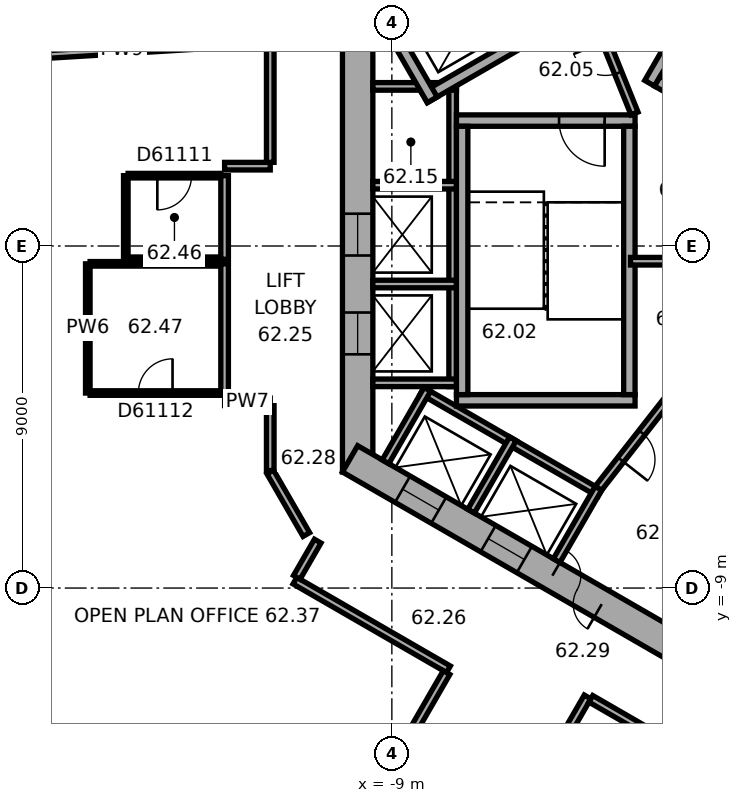
"""IFC4 building model, lengths in metres.
Left out: names, types, materials, properties, quantities, classifications, styles, units other than length and angle.
Written with IfcOpenShell. Run it as: python <this file> out.ifc"""

import sys

from ifc_helpers import new_model, si_unit, direction, frame, frame_2d, origin, place, context, subcontext, project, spatial, rectangle, extrude, element, fill, save


model = new_model("IFC4")
c1 = context("Model", 3, precision=1e-05, world=origin(), true_north=direction((0.0, 1.0)))
c2 = subcontext(c1, "Body", "Model", "MODEL_VIEW")
j1 = project(units=[si_unit("LENGTHUNIT", "METRE"), si_unit("PLANEANGLEUNIT", "RADIAN")], contexts=[c1])
p1 = place(None, origin())
s1 = spatial("IfcSite", under=j1, at=p1, CompositionType="ELEMENT")
p2 = place(p1, origin())
s2 = spatial("IfcBuilding", under=s1, at=p2, CompositionType="ELEMENT")
p3 = place(p2, frame((0.0, 0.0, 251.3)))
s3 = spatial("IfcBuildingStorey", under=s2, at=p3, CompositionType="ELEMENT", Elevation=251.3)
p4 = place(p3, frame((-9.9, 5.947, 0.0), z_axis=(0.0, 0.0, 1.0), x_axis=(0.0, -1.0, 0.0)))
e1 = element("IfcWall", 1, at=p4, inside=s3, PredefinedType="SHEAR", context=c2, shape_type="SweptSolid", body=[
    extrude(rectangle(XDim=11.894, YDim=0.8, at=frame_2d((5.947, 0.0))), origin(), (0.0, 0.0, 1.0), 3.7),
])
p5 = place(p4, frame((5.097, 0.0, 0.0)))
e2 = element("IfcOpeningElement", 2, at=p5, cuts=e1, PredefinedType="OPENING", context=c2, shape_type="SweptSolid", body=[
    extrude(rectangle(XDim=1.1, YDim=2.1, at=frame_2d((0.55, 1.05))), frame((0.0, 0.41, 0.0), z_axis=(0.0, -1.0, 0.0), x_axis=(1.0, 0.0, 0.0)), (0.0, 0.0, 1.0), 0.82),
])
p6 = place(p4, frame((7.697, 0.0, 0.0)))
e3 = element("IfcOpeningElement", 3, at=p6, cuts=e1, PredefinedType="OPENING", context=c2, shape_type="SweptSolid", body=[
    extrude(rectangle(XDim=1.1, YDim=2.1, at=frame_2d((0.55, 1.05))), frame((0.0, 0.41, 0.0), z_axis=(0.0, -1.0, 0.0), x_axis=(1.0, 0.0, 0.0)), (0.0, 0.0, 1.0), 0.82),
])
p7 = place(p3, frame((-10.1, -5.6, 0.0), z_axis=(0.0, 0.0, 1.0), x_axis=(0.866023897231, -0.500002609418, 0.0)))
e4 = element("IfcWall", 4, at=p7, inside=s3, PredefinedType="SHEAR", context=c2, shape_type="SweptSolid", body=[
    extrude(rectangle(XDim=11.894, YDim=0.8, at=frame_2d((5.947, 0.0))), origin(), (0.0, 0.0, 1.0), 3.7),
])
p8 = place(p7, frame((6.147, 0.0, 0.0)))
e5 = element("IfcOpeningElement", 5, at=p8, cuts=e4, PredefinedType="OPENING", context=c2, shape_type="SweptSolid", body=[
    extrude(rectangle(XDim=1.5, YDim=2.1, at=frame_2d((0.75, 1.05))), frame((0.0, 0.41, 0.0), z_axis=(0.0, -1.0, 0.0), x_axis=(1.0, 0.0, 0.0)), (0.0, 0.0, 1.0), 0.82),
])
p9 = place(p7, frame((1.597, 0.0, 0.0)))
e6 = element("IfcOpeningElement", 6, at=p9, cuts=e4, PredefinedType="OPENING", context=c2, shape_type="SweptSolid", body=[
    extrude(rectangle(XDim=1.1, YDim=2.1, at=frame_2d((0.55, 1.05))), frame((0.0, 0.41, 0.0), z_axis=(0.0, -1.0, 0.0), x_axis=(1.0, 0.0, 0.0)), (0.0, 0.0, 1.0), 0.82),
])
p10 = place(p7, frame((4.197, 0.0, 0.0)))
e7 = element("IfcOpeningElement", 7, at=p10, cuts=e4, PredefinedType="OPENING", context=c2, shape_type="SweptSolid", body=[
    extrude(rectangle(XDim=1.1, YDim=2.1, at=frame_2d((0.55, 1.05))), frame((0.0, 0.41, 0.0), z_axis=(0.0, -1.0, 0.0), x_axis=(1.0, 0.0, 0.0)), (0.0, 0.0, 1.0), 0.82),
])
p11 = place(p3, frame((-19.873, -9.869, 0.0), z_axis=(0.0, 0.0, 1.0), x_axis=(0.52626914263, -0.850318051975, 0.0)))
e8 = element("IfcWall", 8, at=p11, inside=s3, PredefinedType="STANDARD", context=c2, shape_type="SweptSolid", body=[
    extrude(rectangle(XDim=4.13, YDim=0.2, at=frame_2d((2.065, 0.0))), origin(), (0.0, 0.0, 1.0), 3.7),
])
p12 = place(p11, frame((0.665, 0.0, 0.9)))
e9 = element("IfcOpeningElement", 9, at=p12, cuts=e8, PredefinedType="OPENING", context=c2, shape_type="SweptSolid", body=[
    extrude(rectangle(XDim=2.8, YDim=2.0, at=frame_2d((1.4, 1.0))), frame((0.0, 0.11, 0.0), z_axis=(0.0, -1.0, 0.0), x_axis=(1.0, 0.0, 0.0)), (0.0, 0.0, 1.0), 0.22),
])
p13 = place(p3, frame((-7.4, 4.3, 0.0), z_axis=(0.0, 0.0, 1.0), x_axis=(0.0, -1.0, 0.0)))
e10 = element("IfcWall", 10, at=p13, inside=s3, PredefinedType="PARTITIONING", context=c2, shape_type="SweptSolid", body=[
    extrude(rectangle(XDim=8.0, YDim=0.2, at=frame_2d((4.0, 0.0))), origin(), (0.0, 0.0, 1.0), 3.35),
])
for number, where, z_axis, x_axis in (
    (11, (-7.3, 4.2, 0.0), (0.0, 0.0, 1.0), (-1.0, 0.0, 0.0)),
    (12, (-7.3, 1.6, 0.0), (0.0, 0.0, 1.0), (-1.0, 0.0, 0.0)),
    (13, (-7.3, -1.0, 0.0), (0.0, 0.0, 1.0), (-1.0, 0.0, 0.0)),
    (14, (-7.3, -3.6, 0.0), (0.0, 0.0, 1.0), (-1.0, 0.0, 0.0)),
):
    element("IfcWall", number, at=place(p3, frame(where, z_axis=z_axis, x_axis=x_axis)), inside=s3, PredefinedType="PARTITIONING", context=c2, shape_type="SweptSolid", body=[
        extrude(rectangle(XDim=2.2, YDim=0.2, at=frame_2d((1.1, 0.0))), origin(), (0.0, 0.0, 1.0), 3.35),
    ])
p14 = place(p3, frame((-8.203, -3.809, 0.0), z_axis=(0.0, 0.0, 1.0), x_axis=(0.866028230842, -0.499995103361, 0.0)))
e15 = element("IfcWall", 15, at=p14, inside=s3, PredefinedType="PARTITIONING", context=c2, shape_type="SweptSolid", body=[
    extrude(rectangle(XDim=5.4, YDim=0.2, at=frame_2d((2.7, 0.0))), origin(), (0.0, 0.0, 1.0), 3.35),
])
for number, where, z_axis, x_axis in (
    (16, (-8.067, -3.772, 0.0), (0.0, 0.0, 1.0), (-0.5, -0.866, 0.0)),
    (17, (-5.815, -5.072, 0.0), (0.0, 0.0, 1.0), (-0.5, -0.866, 0.0)),
):
    element("IfcWall", number, at=place(p3, frame(where, z_axis=z_axis, x_axis=x_axis)), inside=s3, PredefinedType="PARTITIONING", context=c2, shape_type="SweptSolid", body=[
        extrude(rectangle(XDim=2.2, YDim=0.2, at=frame_2d((1.1, 0.0))), origin(), (0.0, 0.0, 1.0), 3.35),
    ])
p15 = place(p3, frame((-3.563, -6.372, 0.0), z_axis=(0.0, 0.0, 1.0), x_axis=(-0.499994660107, -0.866028486751, 0.0)))
e18 = element("IfcWall", 18, at=p15, inside=s3, PredefinedType="PARTITIONING", context=c2, shape_type="SweptSolid", body=[
    extrude(rectangle(XDim=2.2, YDim=0.2, at=frame_2d((1.1, 0.0))), origin(), (0.0, 0.0, 1.0), 3.35),
])
p16 = place(p3, frame((-2.216, 4.282, 0.0), z_axis=(0.0, 0.0, 1.0), x_axis=(0.499977259774, 0.866038532462, 0.0)))
e19 = element("IfcWall", 19, at=p16, inside=s3, PredefinedType="SHEAR", context=c2, shape_type="SweptSolid", body=[
    extrude(rectangle(XDim=4.7, YDim=0.3, at=frame_2d((2.35, 0.0))), origin(), (0.0, 0.0, 1.0), 3.35),
])
p17 = place(p3, frame((4.103, 0.807, 0.0), z_axis=(0.0, 0.0, 1.0), x_axis=(-0.866027801685, 0.499995846692, 0.0)))
e20 = element("IfcWall", 20, at=p17, inside=s3, PredefinedType="SHEAR", context=c2, shape_type="SweptSolid", body=[
    extrude(rectangle(XDim=7.06, YDim=0.3, at=frame_2d((3.53, 0.0))), origin(), (0.0, 0.0, 1.0), 3.35),
])
p18 = place(p3, frame((-2.6, 3.3, 0.0), z_axis=(0.0, 0.0, 1.0), x_axis=(-1.0, 0.0, 0.0)))
e21 = element("IfcWall", 21, at=p18, inside=s3, PredefinedType="SHEAR", context=c2, shape_type="SweptSolid", body=[
    extrude(rectangle(XDim=4.7, YDim=0.3, at=frame_2d((2.35, 0.0))), origin(), (0.0, 0.0, 1.0), 3.35),
])
p19 = place(p18, frame((0.8, 0.0, 0.0)))
e22 = element("IfcOpeningElement", 22, at=p19, cuts=e21, PredefinedType="OPENING", context=c2, shape_type="SweptSolid", body=[
    extrude(rectangle(XDim=1.2, YDim=2.1, at=frame_2d((0.6, 1.05))), frame((0.0, 0.16, 0.0), z_axis=(0.0, -1.0, 0.0), x_axis=(1.0, 0.0, 0.0)), (0.0, 0.0, 1.0), 0.32),
])
p20 = place(p3, frame((-2.6, -4.06, 0.0), z_axis=(0.0, 0.0, 1.0), x_axis=(-1.0, 0.0, 0.0)))
e23 = element("IfcWall", 23, at=p20, inside=s3, PredefinedType="SHEAR", context=c2, shape_type="SweptSolid", body=[
    extrude(rectangle(XDim=4.7, YDim=0.3, at=frame_2d((2.35, 0.0))), origin(), (0.0, 0.0, 1.0), 3.35),
])
for number, where, z_axis, x_axis in (
    (24, (-2.75, 3.15, 0.0), (0.0, 0.0, 1.0), (0.0, -1.0, 0.0)),
    (25, (-7.15, 3.15, 0.0), (0.0, 0.0, 1.0), (0.0, -1.0, 0.0)),
):
    element("IfcWall", number, at=place(p3, frame(where, z_axis=z_axis, x_axis=x_axis)), inside=s3, PredefinedType="SHEAR", context=c2, shape_type="SweptSolid", body=[
        extrude(rectangle(XDim=7.06, YDim=0.3, at=frame_2d((3.53, 0.0))), origin(), (0.0, 0.0, 1.0), 3.35),
    ])
p21 = place(p3, frame((-5.24, 5.577, 0.0), z_axis=(0.0, 0.0, 1.0), x_axis=(-0.866014461049, -0.500018952895, 0.0)))
e26 = element("IfcWall", 26, at=p21, inside=s3, PredefinedType="SHEAR", context=c2, shape_type="SweptSolid", body=[
    extrude(rectangle(XDim=3.35, YDim=0.3, at=frame_2d((1.675, 0.0))), origin(), (0.0, 0.0, 1.0), 3.35),
])
p22 = place(p3, frame((-7.937, 3.847, 0.0), z_axis=(0.0, 0.0, 1.0), x_axis=(-0.50002983664, 0.866008176907, 0.0)))
e27 = element("IfcWall", 27, at=p22, inside=s3, PredefinedType="SHEAR", context=c2, shape_type="SweptSolid", body=[
    extrude(rectangle(XDim=2.2, YDim=0.3, at=frame_2d((1.1, 0.0))), origin(), (0.0, 0.0, 1.0), 3.35),
])
p23 = place(p3, frame((-2.615, 3.487, 0.0), z_axis=(0.0, 0.0, 1.0), x_axis=(-0.373576831041, 0.92759924068, 0.0)))
e28 = element("IfcWall", 28, at=p23, inside=s3, PredefinedType="PARTITIONING", context=c2, shape_type="SweptSolid", body=[
    extrude(rectangle(XDim=3.002, YDim=0.2, at=frame_2d((1.501, 0.0))), origin(), (0.0, 0.0, 1.0), 3.35),
])
p24 = place(p23, frame((1.15, 0.0, 0.0)))
e29 = element("IfcOpeningElement", 29, at=p24, cuts=e28, PredefinedType="OPENING", context=c2, shape_type="SweptSolid", body=[
    extrude(rectangle(XDim=0.9, YDim=2.1, at=frame_2d((0.45, 1.05))), frame((0.0, 0.11, 0.0), z_axis=(0.0, -1.0, 0.0), x_axis=(1.0, 0.0, 0.0)), (0.0, 0.0, 1.0), 0.22),
])
p25 = place(p3, frame((-1.712, -4.008, 0.0), z_axis=(0.0, 0.0, 1.0), x_axis=(-0.616549420702, -0.787316208287, 0.0)))
e30 = element("IfcWall", 30, at=p25, inside=s3, PredefinedType="PARTITIONING", context=c2, shape_type="SweptSolid", body=[
    extrude(rectangle(XDim=3.002, YDim=0.2, at=frame_2d((1.501, 0.0))), origin(), (0.0, 0.0, 1.0), 3.35),
])
p26 = place(p25, frame((1.15, 0.0, 0.0)))
e31 = element("IfcOpeningElement", 31, at=p26, cuts=e30, PredefinedType="OPENING", context=c2, shape_type="SweptSolid", body=[
    extrude(rectangle(XDim=0.9, YDim=2.1, at=frame_2d((0.45, 1.05))), frame((0.0, 0.11, 0.0), z_axis=(0.0, -1.0, 0.0), x_axis=(1.0, 0.0, 0.0)), (0.0, 0.0, 1.0), 0.22),
])
p27 = place(p3, frame((-2.72, -0.4, 0.0), z_axis=(0.0, 0.0, 1.0), x_axis=(1.0, 0.0, 0.0)))
e32 = element("IfcWall", 32, at=p27, inside=s3, PredefinedType="PARTITIONING", context=c2, shape_type="SweptSolid", body=[
    extrude(rectangle(XDim=7.347, YDim=0.2, at=frame_2d((3.674, 0.0))), origin(), (0.0, 0.0, 1.0), 3.35),
])
p28 = place(p3, frame((-19.888, 4.927, 0.0), z_axis=(0.0, 0.0, 1.0), x_axis=(0.998133794525, 0.061064950896, 0.0)))
e33 = element("IfcWall", 33, at=p28, inside=s3, PredefinedType="PARTITIONING", context=c2, shape_type="SweptSolid", body=[
    extrude(rectangle(XDim=7.592, YDim=0.2, at=frame_2d((3.796, 0.0))), origin(), (0.0, 0.0, 1.0), 3.35),
])
p29 = place(p3, frame((-17.001, -3.869, 0.0), z_axis=(0.0, 0.0, 1.0), x_axis=(0.0, 1.0, 0.0)))
e34 = element("IfcWall", 34, at=p29, inside=s3, PredefinedType="PARTITIONING", context=c2, shape_type="SweptSolid", body=[
    extrude(rectangle(XDim=3.4, YDim=0.12, at=frame_2d((1.7, 0.0))), origin(), (0.0, 0.0, 1.0), 3.35),
])
p30 = place(p3, frame((-16.941, -0.469, 0.0), z_axis=(0.0, 0.0, 1.0), x_axis=(1.0, 0.0, 0.0)))
e35 = element("IfcWall", 35, at=p30, inside=s3, PredefinedType="PARTITIONING", context=c2, shape_type="SweptSolid", body=[
    extrude(rectangle(XDim=3.44, YDim=0.12, at=frame_2d((1.72, 0.0))), origin(), (0.0, 0.0, 1.0), 3.35),
])
p31 = place(p3, frame((-16.001, -0.349, 0.0), z_axis=(0.0, 0.0, 1.0), x_axis=(0.0, 1.0, 0.0)))
e36 = element("IfcWall", 36, at=p31, inside=s3, PredefinedType="PARTITIONING", context=c2, shape_type="SweptSolid", body=[
    extrude(rectangle(XDim=2.2, YDim=0.12, at=frame_2d((1.1, 0.0))), origin(), (0.0, 0.0, 1.0), 3.35),
])
p32 = place(p3, frame((-15.941, 1.851, 0.0), z_axis=(0.0, 0.0, 1.0), x_axis=(1.0, 0.0, 0.0)))
e37 = element("IfcWall", 37, at=p32, inside=s3, PredefinedType="PARTITIONING", context=c2, shape_type="SweptSolid", body=[
    extrude(rectangle(XDim=2.44, YDim=0.12, at=frame_2d((1.22, 0.0))), origin(), (0.0, 0.0, 1.0), 3.35),
])
p33 = place(p32, frame((0.77, 0.0, 0.0)))
e38 = element("IfcOpeningElement", 38, at=p33, cuts=e37, PredefinedType="OPENING", context=c2, shape_type="SweptSolid", body=[
    extrude(rectangle(XDim=0.9, YDim=2.1, at=frame_2d((0.45, 1.05))), frame((0.0, 0.07, 0.0), z_axis=(0.0, -1.0, 0.0), x_axis=(1.0, 0.0, 0.0)), (0.0, 0.0, 1.0), 0.14),
])
p34 = place(p3, frame((-13.501, -3.869, 0.0), z_axis=(0.0, 0.0, 1.0), x_axis=(-1.0, 0.0, 0.0)))
e39 = element("IfcWall", 39, at=p34, inside=s3, PredefinedType="PARTITIONING", context=c2, shape_type="SweptSolid", body=[
    extrude(rectangle(XDim=3.44, YDim=0.12, at=frame_2d((1.72, 0.0))), origin(), (0.0, 0.0, 1.0), 3.35),
])
p35 = place(p34, frame((1.27, 0.0, 0.0)))
e40 = element("IfcOpeningElement", 40, at=p35, cuts=e39, PredefinedType="OPENING", context=c2, shape_type="SweptSolid", body=[
    extrude(rectangle(XDim=0.9, YDim=2.1, at=frame_2d((0.45, 1.05))), frame((0.0, 0.07, 0.0), z_axis=(0.0, -1.0, 0.0), x_axis=(1.0, 0.0, 0.0)), (0.0, 0.0, 1.0), 0.14),
])
p36 = place(p3, frame((-13.501, -0.349, 0.0), z_axis=(0.0, 0.0, 1.0), x_axis=(-1.0, 0.0, 0.0)))
e41 = element("IfcWall", 41, at=p36, inside=s3, PredefinedType="PARTITIONING", context=c2, shape_type="SweptSolid", body=[
    extrude(rectangle(XDim=2.44, YDim=0.12, at=frame_2d((1.22, 0.0))), origin(), (0.0, 0.0, 1.0), 3.35),
])
p37 = place(p3, frame((-13.401, -4.101, 0.0), z_axis=(0.0, 0.0, 1.0), x_axis=(1.0, 0.0, 0.0)))
e42 = element("IfcWall", 42, at=p37, inside=s3, PredefinedType="PARTITIONING", context=c2, shape_type="SweptSolid", body=[
    extrude(rectangle(XDim=1.201, YDim=0.2, at=frame_2d((0.601, 0.0))), origin(), (0.0, 0.0, 1.0), 3.35),
])
p38 = place(p3, frame((-13.401, -0.469, 0.0), z_axis=(0.0, 0.0, 1.0), x_axis=(0.0, -1.0, 0.0)))
e43 = element("IfcWall", 43, at=p38, inside=s3, PredefinedType="PARTITIONING", context=c2, shape_type="SweptSolid", body=[
    extrude(rectangle(XDim=3.4, YDim=0.2, at=frame_2d((1.7, 0.0))), origin(), (0.0, 0.0, 1.0), 3.35),
])
p39 = place(p3, frame((-13.401, 1.851, 0.0), z_axis=(0.0, 0.0, 1.0), x_axis=(0.0, -1.0, 0.0)))
e44 = element("IfcWall", 44, at=p39, inside=s3, PredefinedType="PARTITIONING", context=c2, shape_type="SweptSolid", body=[
    extrude(rectangle(XDim=2.2, YDim=0.2, at=frame_2d((1.1, 0.0))), origin(), (0.0, 0.0, 1.0), 3.35),
])
p40 = place(p3, frame((-12.2, -5.947, 0.0), z_axis=(0.0, 0.0, 1.0), x_axis=(0.500022797313, -0.86601224135, 0.0)))
e45 = element("IfcWall", 45, at=p40, inside=s3, PredefinedType="PARTITIONING", context=c2, shape_type="SweptSolid", body=[
    extrude(rectangle(XDim=1.9, YDim=0.2, at=frame_2d((0.95, 0.0))), origin(), (0.0, 0.0, 1.0), 3.35),
])
p41 = place(p3, frame((-12.2, -4.201, 0.0), z_axis=(0.0, 0.0, 1.0), x_axis=(0.0, -1.0, 0.0)))
e46 = element("IfcWall", 46, at=p41, inside=s3, PredefinedType="PARTITIONING", context=c2, shape_type="SweptSolid", body=[
    extrude(rectangle(XDim=1.706, YDim=0.2, at=frame_2d((0.853, 0.0))), origin(), (0.0, 0.0, 1.0), 3.35),
])
p42 = place(p3, frame((-12.2, 2.101, 0.0), z_axis=(0.0, 0.0, 1.0), x_axis=(-1.0, 0.0, 0.0)))
e47 = element("IfcWall", 47, at=p42, inside=s3, PredefinedType="PARTITIONING", context=c2, shape_type="SweptSolid", body=[
    extrude(rectangle(XDim=1.201, YDim=0.2, at=frame_2d((0.601, 0.0))), origin(), (0.0, 0.0, 1.0), 3.35),
])
p43 = place(p3, frame((-12.2, 5.947, 0.0), z_axis=(0.0, 0.0, 1.0), x_axis=(0.0, -1.0, 0.0)))
e48 = element("IfcWall", 48, at=p43, inside=s3, PredefinedType="PARTITIONING", context=c2, shape_type="SweptSolid", body=[
    extrude(rectangle(XDim=3.746, YDim=0.2, at=frame_2d((1.873, 0.0))), origin(), (0.0, 0.0, 1.0), 3.35),
])
p44 = place(p3, frame((-11.551, -8.805, 0.0), z_axis=(0.0, 0.0, 1.0), x_axis=(0.866038310922, -0.499977643516, 0.0)))
e49 = element("IfcWall", 49, at=p44, inside=s3, PredefinedType="PARTITIONING", context=c2, shape_type="SweptSolid", body=[
    extrude(rectangle(XDim=4.665, YDim=0.2, at=frame_2d((2.333, 0.0))), origin(), (0.0, 0.0, 1.0), 3.35),
])
p45 = place(p3, frame((-10.951, -7.765, 0.0), z_axis=(0.0, 0.0, 1.0), x_axis=(-0.499978356969, -0.866037899034, 0.0)))
e50 = element("IfcWall", 50, at=p45, inside=s3, PredefinedType="PARTITIONING", context=c2, shape_type="SweptSolid", body=[
    extrude(rectangle(XDim=1.101, YDim=0.2, at=frame_2d((0.551, 0.0))), origin(), (0.0, 0.0, 1.0), 3.35),
])
p46 = place(p3, frame((-10.585, -16.463, 0.0), z_axis=(0.0, 0.0, 1.0), x_axis=(0.499993802756, 0.866028981735, 0.0)))
e51 = element("IfcWall", 51, at=p46, inside=s3, PredefinedType="PARTITIONING", context=c2, shape_type="SweptSolid", body=[
    extrude(rectangle(XDim=6.049, YDim=0.2, at=frame_2d((3.024, 0.0))), origin(), (0.0, 0.0, 1.0), 2.65),
])
p47 = place(p46, frame((2.524, 0.0, 0.0)))
e52 = element("IfcOpeningElement", 52, at=p47, cuts=e51, PredefinedType="OPENING", context=c2, shape_type="SweptSolid", body=[
    extrude(rectangle(XDim=1.0, YDim=2.1, at=frame_2d((0.5, 1.05))), frame((0.0, 0.11, 0.0), z_axis=(0.0, -1.0, 0.0), x_axis=(1.0, 0.0, 0.0)), (0.0, 0.0, 1.0), 0.22),
])
p48 = place(p3, frame((-7.525, -18.23, 0.0), z_axis=(0.0, 0.0, 1.0), x_axis=(0.499983153418, 0.866035129944, 0.0)))
e53 = element("IfcWall", 53, at=p48, inside=s3, PredefinedType="PARTITIONING", context=c2, shape_type="SweptSolid", body=[
    extrude(rectangle(XDim=7.35, YDim=0.2, at=frame_2d((3.675, 0.0))), origin(), (0.0, 0.0, 1.0), 3.35),
])
p49 = place(p48, frame((3.175, 0.0, 0.0)))
e54 = element("IfcOpeningElement", 54, at=p49, cuts=e53, PredefinedType="OPENING", context=c2, shape_type="SweptSolid", body=[
    extrude(rectangle(XDim=1.0, YDim=2.1, at=frame_2d((0.5, 1.05))), frame((0.0, 0.11, 0.0), z_axis=(0.0, -1.0, 0.0), x_axis=(1.0, 0.0, 0.0)), (0.0, 0.0, 1.0), 0.22),
])
p50 = place(p3, frame((-3.763, -11.915, 0.0), z_axis=(0.0, 0.0, 1.0), x_axis=(0.866037915695, -0.499978328108, 0.0)))
e55 = element("IfcWall", 55, at=p50, inside=s3, PredefinedType="PARTITIONING", context=c2, shape_type="SweptSolid", body=[
    extrude(rectangle(XDim=3.249, YDim=0.2, at=frame_2d((1.625, 0.0))), origin(), (0.0, 0.0, 1.0), 3.35),
])
p51 = place(p8, origin())
e56 = element("IfcDoor", 56, at=p51, inside=s3, OperationType="DOUBLE_DOOR_SINGLE_SWING", PredefinedType="DOOR", context=c2, shape_type="SweptSolid", body=[
    extrude(rectangle(XDim=1.5, YDim=2.1, at=frame_2d((0.75, 1.05))), frame((0.0, 0.025, 0.0), z_axis=(0.0, -1.0, 0.0), x_axis=(1.0, 0.0, 0.0)), (0.0, 0.0, 1.0), 0.05),
])
fill(e5, e56)
p52 = place(p19, origin())
e57 = element("IfcDoor", 57, at=p52, inside=s3, OperationType="SINGLE_SWING_RIGHT", PredefinedType="DOOR", context=c2, shape_type="SweptSolid", body=[
    extrude(rectangle(XDim=1.2, YDim=2.1, at=frame_2d((0.6, 1.05))), frame((0.0, 0.025, 0.0), z_axis=(0.0, -1.0, 0.0), x_axis=(1.0, 0.0, 0.0)), (0.0, 0.0, 1.0), 0.05),
])
fill(e22, e57)
p53 = place(p24, origin())
e58 = element("IfcDoor", 58, at=p53, inside=s3, OperationType="SINGLE_SWING_LEFT", PredefinedType="DOOR", context=c2, shape_type="SweptSolid", body=[
    extrude(rectangle(XDim=0.9, YDim=2.1, at=frame_2d((0.45, 1.05))), frame((0.0, 0.025, 0.0), z_axis=(0.0, -1.0, 0.0), x_axis=(1.0, 0.0, 0.0)), (0.0, 0.0, 1.0), 0.05),
])
fill(e29, e58)
p54 = place(p26, origin())
e59 = element("IfcDoor", 59, at=p54, inside=s3, OperationType="SINGLE_SWING_LEFT", PredefinedType="DOOR", context=c2, shape_type="SweptSolid", body=[
    extrude(rectangle(XDim=0.9, YDim=2.1, at=frame_2d((0.45, 1.05))), frame((0.0, 0.025, 0.0), z_axis=(0.0, -1.0, 0.0), x_axis=(1.0, 0.0, 0.0)), (0.0, 0.0, 1.0), 0.05),
])
fill(e31, e59)
p55 = place(p5, origin())
e60 = element("IfcDoor", 60, at=p55, inside=s3, OperationType="DOUBLE_DOOR_SLIDING", PredefinedType="DOOR", context=c2, shape_type="SweptSolid", body=[
    extrude(rectangle(XDim=1.1, YDim=2.1, at=frame_2d((0.55, 1.05))), frame((0.0, 0.025, 0.0), z_axis=(0.0, -1.0, 0.0), x_axis=(1.0, 0.0, 0.0)), (0.0, 0.0, 1.0), 0.05),
])
fill(e2, e60)
p56 = place(p6, origin())
e61 = element("IfcDoor", 61, at=p56, inside=s3, OperationType="DOUBLE_DOOR_SLIDING", PredefinedType="DOOR", context=c2, shape_type="SweptSolid", body=[
    extrude(rectangle(XDim=1.1, YDim=2.1, at=frame_2d((0.55, 1.05))), frame((0.0, 0.025, 0.0), z_axis=(0.0, -1.0, 0.0), x_axis=(1.0, 0.0, 0.0)), (0.0, 0.0, 1.0), 0.05),
])
fill(e3, e61)
p57 = place(p9, origin())
e62 = element("IfcDoor", 62, at=p57, inside=s3, OperationType="DOUBLE_DOOR_SLIDING", PredefinedType="DOOR", context=c2, shape_type="SweptSolid", body=[
    extrude(rectangle(XDim=1.1, YDim=2.1, at=frame_2d((0.55, 1.05))), frame((0.0, 0.025, 0.0), z_axis=(0.0, -1.0, 0.0), x_axis=(1.0, 0.0, 0.0)), (0.0, 0.0, 1.0), 0.05),
])
fill(e6, e62)
p58 = place(p10, origin())
e63 = element("IfcDoor", 63, at=p58, inside=s3, OperationType="DOUBLE_DOOR_SLIDING", PredefinedType="DOOR", context=c2, shape_type="SweptSolid", body=[
    extrude(rectangle(XDim=1.1, YDim=2.1, at=frame_2d((0.55, 1.05))), frame((0.0, 0.025, 0.0), z_axis=(0.0, -1.0, 0.0), x_axis=(1.0, 0.0, 0.0)), (0.0, 0.0, 1.0), 0.05),
])
fill(e7, e63)
p59 = place(p33, origin())
e64 = element("IfcDoor", 64, at=p59, inside=s3, OperationType="SINGLE_SWING_LEFT", PredefinedType="DOOR", context=c2, shape_type="SweptSolid", body=[
    extrude(rectangle(XDim=0.9, YDim=2.1, at=frame_2d((0.45, 1.05))), frame((0.0, 0.025, 0.0), z_axis=(0.0, -1.0, 0.0), x_axis=(1.0, 0.0, 0.0)), (0.0, 0.0, 1.0), 0.05),
])
fill(e38, e64)
p60 = place(p35, origin())
e65 = element("IfcDoor", 65, at=p60, inside=s3, OperationType="SINGLE_SWING_LEFT", PredefinedType="DOOR", context=c2, shape_type="SweptSolid", body=[
    extrude(rectangle(XDim=0.9, YDim=2.1, at=frame_2d((0.45, 1.05))), frame((0.0, 0.025, 0.0), z_axis=(0.0, -1.0, 0.0), x_axis=(1.0, 0.0, 0.0)), (0.0, 0.0, 1.0), 0.05),
])
fill(e40, e65)
save(model, sys.argv[1])
